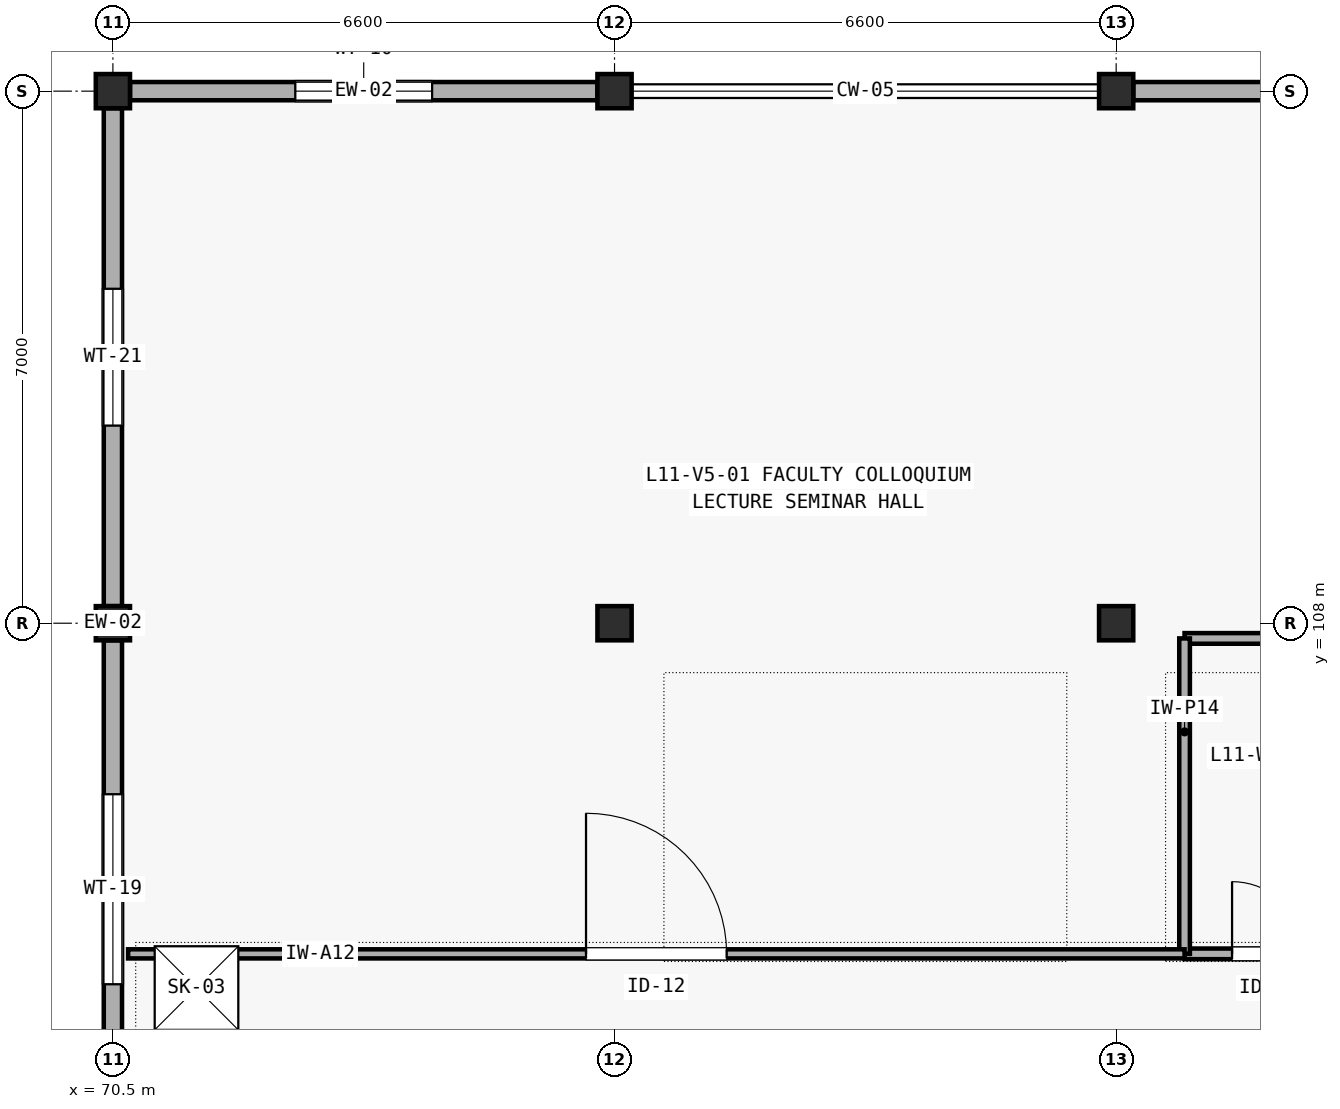
"""IFC4 building model, lengths in metres.
Left out: names, types, materials, properties, quantities, classifications, styles, units other than length and angle.
Written with IfcOpenShell. Run it as: python <this file> out.ifc"""

import sys

from ifc_helpers import new_model, si_unit, direction, frame, frame_2d, origin, origin_2d, place, context, subcontext, project, spatial, rectangle, extrude, element, fill, save


model = new_model("IFC4")
c1 = context("Model", 3, precision=1e-05, world=origin(), true_north=direction((0.0, 1.0)))
c2 = subcontext(c1, "Body", "Model", "MODEL_VIEW")
j1 = project(units=[si_unit("LENGTHUNIT", "METRE"), si_unit("PLANEANGLEUNIT", "RADIAN")], contexts=[c1])
p1 = place(None, origin())
s1 = spatial("IfcSite", under=j1, at=p1, CompositionType="ELEMENT")
p2 = place(p1, origin())
s2 = spatial("IfcBuilding", under=s1, at=p2, CompositionType="ELEMENT")
p3 = place(p2, frame((0.0, 0.0, 46.2)))
s3 = spatial("IfcBuildingStorey", under=s2, at=p3, CompositionType="ELEMENT", Elevation=46.2)
for number, where, z_axis, x_axis in (
    (1, (70.5, 108.0, 0.0), (0.0, 0.0, 1.0), (1.0, 0.0, 0.0)),
    (2, (70.5, 115.0, 0.0), (0.0, 0.0, 1.0), (1.0, 0.0, 0.0)),
    (3, (77.1, 108.0, 0.0), (0.0, 0.0, 1.0), (1.0, 0.0, 0.0)),
    (4, (77.1, 115.0, 0.0), (0.0, 0.0, 1.0), (1.0, 0.0, 0.0)),
    (5, (83.7, 108.0, 0.0), (0.0, 0.0, 1.0), (1.0, 0.0, 0.0)),
    (6, (83.7, 115.0, 0.0), (0.0, 0.0, 1.0), (1.0, 0.0, 0.0)),
):
    element("IfcColumn", number, at=place(p3, frame(where, z_axis=z_axis, x_axis=x_axis)), inside=s3, PredefinedType="COLUMN", context=c2, shape_type="SweptSolid", body=[
        extrude(rectangle(XDim=0.45, YDim=0.45, at=origin_2d()), origin(), (0.0, 0.0, 1.0), 4.2),
    ])
p4 = place(p3, frame((70.725, 115.0, 0.0), z_axis=(0.0, 0.0, 1.0), x_axis=(1.0, 0.0, 0.0)))
e7 = element("IfcWall", 7, at=p4, inside=s3, PredefinedType="SOLIDWALL", context=c2, shape_type="SweptSolid", body=[
    extrude(rectangle(XDim=6.15, YDim=0.24, at=frame_2d((3.075, 0.0))), origin(), (0.0, 0.0, 1.0), 3.385),
])
p5 = place(p4, frame((2.175, 0.0, 0.85)))
e8 = element("IfcOpeningElement", 8, at=p5, cuts=e7, PredefinedType="OPENING", context=c2, shape_type="SweptSolid", body=[
    extrude(rectangle(XDim=1.8, YDim=1.5, at=frame_2d((0.9, 0.75))), frame((0.0, 0.13, 0.0), z_axis=(0.0, -1.0, 0.0), x_axis=(1.0, 0.0, 0.0)), (0.0, 0.0, 1.0), 0.26),
])
p6 = place(p3, frame((83.925, 115.0, 0.0), z_axis=(0.0, 0.0, 1.0), x_axis=(1.0, 0.0, 0.0)))
e9 = element("IfcWall", 9, at=p6, inside=s3, PredefinedType="SOLIDWALL", context=c2, shape_type="SweptSolid", body=[
    extrude(rectangle(XDim=6.15, YDim=0.24, at=frame_2d((3.075, 0.0))), origin(), (0.0, 0.0, 1.0), 3.135),
])
p7 = place(p6, frame((1.725, 0.0, 0.85)))
e10 = element("IfcOpeningElement", 10, at=p7, cuts=e9, PredefinedType="OPENING", context=c2, shape_type="SweptSolid", body=[
    extrude(rectangle(XDim=2.7, YDim=1.5, at=frame_2d((1.35, 0.75))), frame((0.0, 0.13, 0.0), z_axis=(0.0, -1.0, 0.0), x_axis=(1.0, 0.0, 0.0)), (0.0, 0.0, 1.0), 0.26),
])
p8 = place(p3, frame((70.5, 101.225, 0.0), z_axis=(0.0, 0.0, 1.0), x_axis=(0.0, 1.0, 0.0)))
e11 = element("IfcWall", 11, at=p8, inside=s3, PredefinedType="SOLIDWALL", context=c2, shape_type="SweptSolid", body=[
    extrude(rectangle(XDim=6.55, YDim=0.24, at=frame_2d((3.275, 0.0))), origin(), (0.0, 0.0, 1.0), 3.313),
])
p9 = place(p8, frame((2.025, 0.0, 0.85)))
e12 = element("IfcOpeningElement", 12, at=p9, cuts=e11, PredefinedType="OPENING", context=c2, shape_type="SweptSolid", body=[
    extrude(rectangle(XDim=2.5, YDim=1.25, at=frame_2d((1.25, 0.625))), frame((0.0, 0.13, 0.0), z_axis=(0.0, -1.0, 0.0), x_axis=(1.0, 0.0, 0.0)), (0.0, 0.0, 1.0), 0.26),
])
p10 = place(p3, frame((70.5, 108.225, 0.0), z_axis=(0.0, 0.0, 1.0), x_axis=(0.0, 1.0, 0.0)))
e13 = element("IfcWall", 13, at=p10, inside=s3, PredefinedType="SOLIDWALL", context=c2, shape_type="SweptSolid", body=[
    extrude(rectangle(XDim=6.55, YDim=0.24, at=frame_2d((3.275, 0.0))), origin(), (0.0, 0.0, 1.0), 3.381),
])
p11 = place(p10, frame((2.375, 0.0, 0.85)))
e14 = element("IfcOpeningElement", 14, at=p11, cuts=e13, PredefinedType="OPENING", context=c2, shape_type="SweptSolid", body=[
    extrude(rectangle(XDim=1.8, YDim=1.6, at=frame_2d((0.9, 0.8))), frame((0.0, 0.13, 0.0), z_axis=(0.0, -1.0, 0.0), x_axis=(1.0, 0.0, 0.0)), (0.0, 0.0, 1.0), 0.26),
])
p12 = place(p3, frame((84.6, 103.65, 0.0), z_axis=(0.0, 0.0, 1.0), x_axis=(1.0, 0.0, 0.0)))
e15 = element("IfcWall", 15, at=p12, inside=s3, PredefinedType="PLUMBINGWALL", context=c2, shape_type="SweptSolid", body=[
    extrude(rectangle(XDim=2.2, YDim=0.14, at=frame_2d((1.1, 0.0))), origin(), (0.0, 0.0, 1.0), 3.9),
])
p13 = place(p12, frame((0.625, 0.0, 0.0)))
e16 = element("IfcOpeningElement", 16, at=p13, cuts=e15, PredefinedType="OPENING", context=c2, shape_type="SweptSolid", body=[
    extrude(rectangle(XDim=0.95, YDim=2.1, at=frame_2d((0.475, 1.05))), frame((0.0, 0.08, 0.0), z_axis=(0.0, -1.0, 0.0), x_axis=(1.0, 0.0, 0.0)), (0.0, 0.0, 1.0), 0.16),
])
p14 = place(p3, frame((84.6, 107.8, 0.0), z_axis=(0.0, 0.0, 1.0), x_axis=(1.0, 0.0, 0.0)))
e17 = element("IfcWall", 17, at=p14, inside=s3, PredefinedType="PLUMBINGWALL", context=c2, shape_type="SweptSolid", body=[
    extrude(rectangle(XDim=2.2, YDim=0.14, at=frame_2d((1.1, 0.0))), origin(), (0.0, 0.0, 1.0), 3.135),
])
p15 = place(p3, frame((84.6, 103.65, 0.0), z_axis=(0.0, 0.0, 1.0), x_axis=(0.0, 1.0, 0.0)))
e18 = element("IfcWall", 18, at=p15, inside=s3, PredefinedType="PLUMBINGWALL", context=c2, shape_type="SweptSolid", body=[
    extrude(rectangle(XDim=4.15, YDim=0.14, at=frame_2d((2.075, 0.0))), origin(), (0.0, 0.0, 1.0), 3.9),
])
p16 = place(p3, frame((70.7, 103.65, 0.0), z_axis=(0.0, 0.0, 1.0), x_axis=(1.0, 0.0, 0.0)))
e19 = element("IfcWall", 19, at=p16, inside=s3, PredefinedType="PARTITIONING", context=c2, shape_type="SweptSolid", body=[
    extrude(rectangle(XDim=13.9, YDim=0.12, at=frame_2d((6.95, 0.0))), origin(), (0.0, 0.0, 1.0), 3.9),
])
p17 = place(p16, frame((6.025, 0.0, 0.0)))
e20 = element("IfcOpeningElement", 20, at=p17, cuts=e19, PredefinedType="OPENING", context=c2, shape_type="SweptSolid", body=[
    extrude(rectangle(XDim=1.85, YDim=2.3, at=frame_2d((0.925, 1.15))), frame((0.0, 0.07, 0.0), z_axis=(0.0, -1.0, 0.0), x_axis=(1.0, 0.0, 0.0)), (0.0, 0.0, 1.0), 0.14),
])
p18 = place(p5, origin())
e21 = element("IfcWindow", 21, at=p18, inside=s3, PartitioningType="SINGLE_PANEL", PredefinedType="WINDOW", context=c2, shape_type="SweptSolid", body=[
    extrude(rectangle(XDim=1.8, YDim=1.5, at=frame_2d((0.9, 0.75))), frame((0.0, 0.03, 0.0), z_axis=(0.0, -1.0, 0.0), x_axis=(1.0, 0.0, 0.0)), (0.0, 0.0, 1.0), 0.06),
])
fill(e8, e21)
p19 = place(p9, origin())
e22 = element("IfcWindow", 22, at=p19, inside=s3, PartitioningType="SINGLE_PANEL", PredefinedType="WINDOW", context=c2, shape_type="SweptSolid", body=[
    extrude(rectangle(XDim=2.5, YDim=1.25, at=frame_2d((1.25, 0.625))), frame((0.0, 0.03, 0.0), z_axis=(0.0, -1.0, 0.0), x_axis=(1.0, 0.0, 0.0)), (0.0, 0.0, 1.0), 0.06),
])
fill(e12, e22)
p20 = place(p11, origin())
e23 = element("IfcWindow", 23, at=p20, inside=s3, PartitioningType="SINGLE_PANEL", PredefinedType="WINDOW", context=c2, shape_type="SweptSolid", body=[
    extrude(rectangle(XDim=1.8, YDim=1.6, at=frame_2d((0.9, 0.8))), frame((0.0, 0.03, 0.0), z_axis=(0.0, -1.0, 0.0), x_axis=(1.0, 0.0, 0.0)), (0.0, 0.0, 1.0), 0.06),
])
fill(e14, e23)
p21 = place(p2, frame((0.0, 0.0, 50.4)))
p22 = place(p21, frame((0.0, 0.0, -0.26)))
p23 = place(p22, frame((71.6, 103.2, 0.21)))
e24 = element("IfcWindow", 24, at=p23, inside=s3, PartitioningType="SINGLE_PANEL", PredefinedType="SKYLIGHT", context=c2, shape_type="SweptSolid", body=[
    extrude(rectangle(XDim=1.1, YDim=1.1, at=origin_2d()), origin(), (0.0, 0.0, 1.0), 0.05),
])
p24 = place(p13, origin())
e25 = element("IfcDoor", 25, at=p24, inside=s3, OperationType="SINGLE_SWING_LEFT", PredefinedType="DOOR", context=c2, shape_type="SweptSolid", body=[
    extrude(rectangle(XDim=0.95, YDim=2.1, at=frame_2d((0.475, 1.05))), frame((0.0, 0.025, 0.0), z_axis=(0.0, -1.0, 0.0), x_axis=(1.0, 0.0, 0.0)), (0.0, 0.0, 1.0), 0.05),
])
fill(e16, e25)
p25 = place(p17, origin())
e26 = element("IfcDoor", 26, at=p25, inside=s3, OperationType="SINGLE_SWING_LEFT", PredefinedType="DOOR", context=c2, shape_type="SweptSolid", body=[
    extrude(rectangle(XDim=1.85, YDim=2.3, at=frame_2d((0.925, 1.15))), frame((0.0, 0.025, 0.0), z_axis=(0.0, -1.0, 0.0), x_axis=(1.0, 0.0, 0.0)), (0.0, 0.0, 1.0), 0.05),
])
fill(e20, e26)
save(model, sys.argv[1])
